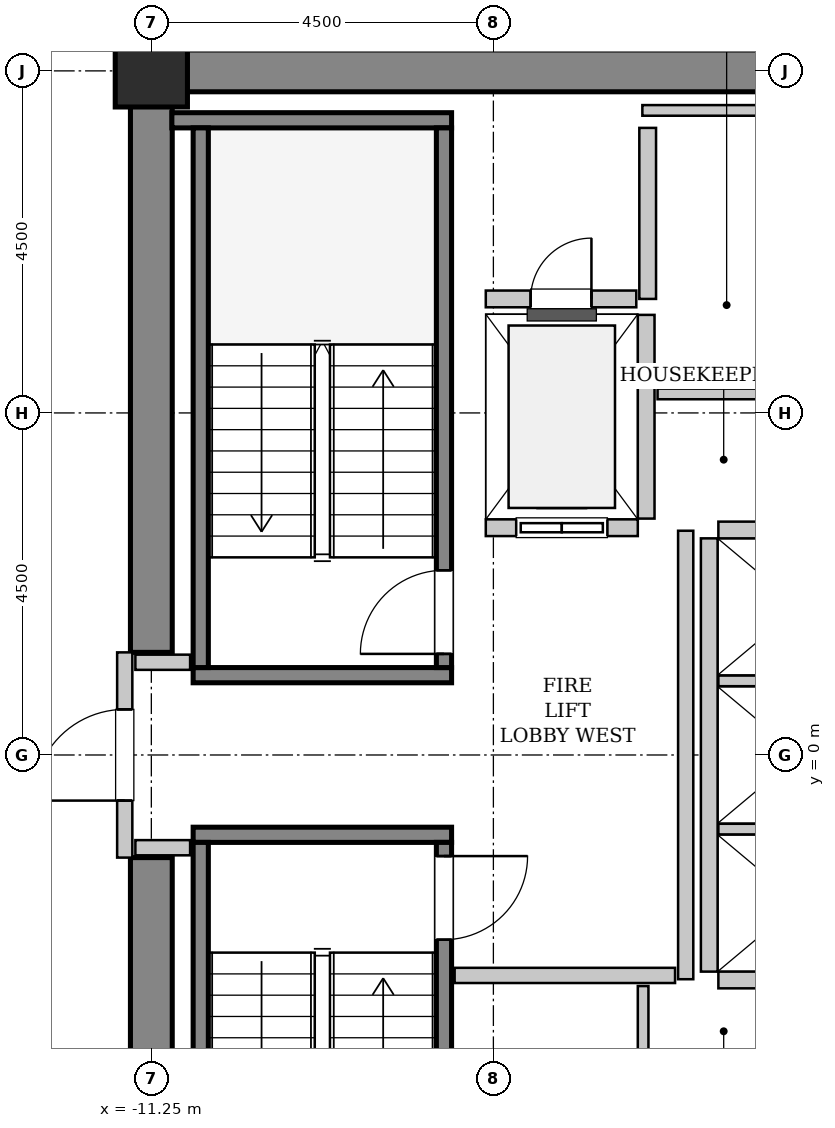
"""IFC4 building model, lengths in metres.
Left out: names, types, materials, properties, quantities, classifications, styles, units other than length and angle.
Written with IfcOpenShell. Run it as: python <this file> out.ifc"""

import sys

from ifc_helpers import new_model, si_unit, direction, frame, frame_2d, origin, origin_2d, place, context, subcontext, project, spatial, rectangle, hollow_rectangle, extrude, source, transform, mapped, element, fill, save


model = new_model("IFC4")
c1 = context("Model", 3, precision=1e-05, world=origin(), true_north=direction((0.0, 1.0)))
c2 = subcontext(c1, "Body", "Model", "MODEL_VIEW")
j1 = project(units=[si_unit("LENGTHUNIT", "METRE"), si_unit("PLANEANGLEUNIT", "RADIAN")], contexts=[c1])
p1 = place(None, origin())
s1 = spatial("IfcSite", under=j1, at=p1, CompositionType="ELEMENT")
p2 = place(p1, origin())
s2 = spatial("IfcBuilding", under=s1, at=p2, CompositionType="ELEMENT")
p3 = place(p2, frame((0.0, 0.0, 167.8)))
s3 = spatial("IfcBuildingStorey", under=s2, at=p3, CompositionType="ELEMENT", Elevation=167.8)
m1 = source(origin(), c2, "Body", "SweptSolid", [
    extrude(rectangle(XDim=9.975, YDim=0.55, at=frame_2d((4.987, 0.0))), origin(), (0.0, 0.0, 1.0), 3.8),
])
p4 = place(p3, frame((-11.525, 9.0, 0.0), z_axis=(0.0, 0.0, 1.0), x_axis=(1.0, 0.0, 0.0)))
e1 = element("IfcWall", 1, at=p4, inside=s3, PredefinedType="SHEAR", context=c2, shape_type="MappedRepresentation", body=[
    mapped(m1, transform((0.0, 0.0, 0.0), x_axis=(1.0, 0.0, 0.0), y_axis=(0.0, 1.0, 0.0), z_axis=(0.0, 0.0, 1.0), scale=1.0)),
])
m2 = source(origin(), c2, "Body", "SweptSolid", [
    extrude(rectangle(XDim=7.375, YDim=0.55, at=frame_2d((3.688, 0.0))), origin(), (0.0, 0.0, 1.0), 3.8),
])
for number, where, z_axis, x_axis in (
    (2, (-11.25, -8.725, 0.0), (0.0, 0.0, 1.0), (0.0, 1.0, 0.0)),
    (3, (-11.25, 1.35, 0.0), (0.0, 0.0, 1.0), (0.0, 1.0, 0.0)),
):
    element("IfcWall", number, at=place(p3, frame(where, z_axis=z_axis, x_axis=x_axis)), inside=s3, PredefinedType="SHEAR", context=c2, shape_type="MappedRepresentation", body=[
        mapped(m2, transform((0.0, 0.0, 0.0), x_axis=(1.0, 0.0, 0.0), y_axis=(0.0, 1.0, 0.0), z_axis=(0.0, 0.0, 1.0), scale=1.0)),
    ])
m3 = source(origin(), c2, "Body", "SweptSolid", [
    extrude(hollow_rectangle(XDim=0.95, YDim=0.95, WallThickness=0.045, InnerFilletRadius=0.045, OuterFilletRadius=0.09, at=origin_2d()), origin(), (0.0, 0.0, 1.0), 3.8),
])
p5 = place(p3, frame((-11.25, 9.0, 0.0), z_axis=(0.0, 0.0, 1.0), x_axis=(1.0, 0.0, 0.0)))
e4 = element("IfcColumn", 4, at=p5, inside=s3, PredefinedType="COLUMN", context=c2, shape_type="MappedRepresentation", body=[
    mapped(m3, transform((0.0, 0.0, 0.0), x_axis=(1.0, 0.0, 0.0), y_axis=(0.0, 1.0, 0.0), z_axis=(0.0, 0.0, 1.0), scale=1.0)),
])
m4 = source(origin(), c2, "Body", "SweptSolid", [
    extrude(rectangle(XDim=3.4, YDim=0.2, at=frame_2d((1.7, 0.0))), origin(), (0.0, 0.0, 1.0), 3.8),
])
p6 = place(p3, frame((-7.3, 1.05, 0.0), z_axis=(0.0, 0.0, 1.0), x_axis=(-1.0, 0.0, 0.0)))
e5 = element("IfcWall", 5, at=p6, inside=s3, PredefinedType="SOLIDWALL", context=c2, shape_type="MappedRepresentation", body=[
    mapped(m4, transform((0.0, 0.0, 0.0), x_axis=(1.0, 0.0, 0.0), y_axis=(0.0, 1.0, 0.0), z_axis=(0.0, 0.0, 1.0), scale=1.0)),
])
m5 = source(origin(), c2, "Body", "SweptSolid", [
    extrude(rectangle(XDim=3.68, YDim=0.2, at=frame_2d((1.84, 0.0))), origin(), (0.0, 0.0, 1.0), 3.8),
])
p7 = place(p3, frame((-7.3, 8.35, 0.0), z_axis=(0.0, 0.0, 1.0), x_axis=(-1.0, 0.0, 0.0)))
e6 = element("IfcWall", 6, at=p7, inside=s3, PredefinedType="SOLIDWALL", context=c2, shape_type="MappedRepresentation", body=[
    mapped(m5, transform((0.0, 0.0, 0.0), x_axis=(1.0, 0.0, 0.0), y_axis=(0.0, 1.0, 0.0), z_axis=(0.0, 0.0, 1.0), scale=1.0)),
])
m6 = source(origin(), c2, "Body", "SweptSolid", [
    extrude(rectangle(XDim=7.1, YDim=0.2, at=frame_2d((3.55, 0.0))), origin(), (0.0, 0.0, 1.0), 3.8),
])
p8 = place(p3, frame((-7.4, 1.15, 0.0), z_axis=(0.0, 0.0, 1.0), x_axis=(0.0, 1.0, 0.0)))
e7 = element("IfcWall", 7, at=p8, inside=s3, PredefinedType="SOLIDWALL", context=c2, shape_type="MappedRepresentation", body=[
    mapped(m6, transform((0.0, 0.0, 0.0), x_axis=(1.0, 0.0, 0.0), y_axis=(0.0, 1.0, 0.0), z_axis=(0.0, 0.0, 1.0), scale=1.0)),
])
p9 = place(p8, frame((0.18, 0.0, 0.0)))
e8 = element("IfcOpeningElement", 8, at=p9, cuts=e7, PredefinedType="OPENING", context=c2, shape_type="SweptSolid", body=[
    extrude(rectangle(XDim=1.1, YDim=2.15, at=frame_2d((0.55, 1.075))), frame((0.0, 0.11, 0.0), z_axis=(0.0, -1.0, 0.0), x_axis=(1.0, 0.0, 0.0)), (0.0, 0.0, 1.0), 0.22),
])
p10 = place(p3, frame((-10.6, 1.15, 0.0), z_axis=(0.0, 0.0, 1.0), x_axis=(0.0, 1.0, 0.0)))
e9 = element("IfcWall", 9, at=p10, inside=s3, PredefinedType="SOLIDWALL", context=c2, shape_type="MappedRepresentation", body=[
    mapped(m6, transform((0.0, 0.0, 0.0), x_axis=(1.0, 0.0, 0.0), y_axis=(0.0, 1.0, 0.0), z_axis=(0.0, 0.0, 1.0), scale=1.0)),
])
p11 = place(p3, frame((-10.7, -1.05, 0.0), z_axis=(0.0, 0.0, 1.0), x_axis=(1.0, 0.0, 0.0)))
e10 = element("IfcWall", 10, at=p11, inside=s3, PredefinedType="SOLIDWALL", context=c2, shape_type="MappedRepresentation", body=[
    mapped(m4, transform((0.0, 0.0, 0.0), x_axis=(1.0, 0.0, 0.0), y_axis=(0.0, 1.0, 0.0), z_axis=(0.0, 0.0, 1.0), scale=1.0)),
])
p12 = place(p3, frame((-10.6, -1.15, 0.0), z_axis=(0.0, 0.0, 1.0), x_axis=(0.0, -1.0, 0.0)))
e11 = element("IfcWall", 11, at=p12, inside=s3, PredefinedType="SOLIDWALL", context=c2, shape_type="MappedRepresentation", body=[
    mapped(m6, transform((0.0, 0.0, 0.0), x_axis=(1.0, 0.0, 0.0), y_axis=(0.0, 1.0, 0.0), z_axis=(0.0, 0.0, 1.0), scale=1.0)),
])
p13 = place(p3, frame((-7.4, -1.15, 0.0), z_axis=(0.0, 0.0, 1.0), x_axis=(0.0, -1.0, 0.0)))
e12 = element("IfcWall", 12, at=p13, inside=s3, PredefinedType="SOLIDWALL", context=c2, shape_type="MappedRepresentation", body=[
    mapped(m6, transform((0.0, 0.0, 0.0), x_axis=(1.0, 0.0, 0.0), y_axis=(0.0, 1.0, 0.0), z_axis=(0.0, 0.0, 1.0), scale=1.0)),
])
p14 = place(p13, frame((0.18, 0.0, 0.0)))
e13 = element("IfcOpeningElement", 13, at=p14, cuts=e12, PredefinedType="OPENING", context=c2, shape_type="SweptSolid", body=[
    extrude(rectangle(XDim=1.1, YDim=2.15, at=frame_2d((0.55, 1.075))), frame((0.0, 0.11, 0.0), z_axis=(0.0, -1.0, 0.0), x_axis=(1.0, 0.0, 0.0)), (0.0, 0.0, 1.0), 0.22),
])
m7 = source(origin(), c2, "Body", "SweptSolid", [
    extrude(rectangle(XDim=2.0, YDim=0.22, at=frame_2d((1.0, 0.0))), origin(), (0.0, 0.0, 1.0), 3.535),
])
p15 = place(p3, frame((-6.85, 2.99, 0.0), z_axis=(0.0, 0.0, 1.0), x_axis=(1.0, 0.0, 0.0)))
e14 = element("IfcWall", 14, at=p15, inside=s3, PredefinedType="SOLIDWALL", context=c2, shape_type="MappedRepresentation", body=[
    mapped(m7, transform((0.0, 0.0, 0.0), x_axis=(1.0, 0.0, 0.0), y_axis=(0.0, 1.0, 0.0), z_axis=(0.0, 0.0, 1.0), scale=1.0)),
])
p16 = place(p15, frame((0.4, 0.0, 0.0)))
e15 = element("IfcOpeningElement", 15, at=p16, cuts=e14, PredefinedType="OPENING", context=c2, shape_type="SweptSolid", body=[
    extrude(rectangle(XDim=1.2, YDim=2.2, at=frame_2d((0.6, 1.1))), frame((0.0, 0.12, 0.0), z_axis=(0.0, -1.0, 0.0), x_axis=(1.0, 0.0, 0.0)), (0.0, 0.0, 1.0), 0.24),
])
m8 = source(origin(), c2, "Body", "SweptSolid", [
    extrude(rectangle(XDim=2.68, YDim=0.22, at=frame_2d((1.34, 0.0))), origin(), (0.0, 0.0, 1.0), 3.535),
])
p17 = place(p3, frame((-4.74, 3.11, 0.0), z_axis=(0.0, 0.0, 1.0), x_axis=(0.0, 1.0, 0.0)))
e16 = element("IfcWall", 16, at=p17, inside=s3, PredefinedType="SOLIDWALL", context=c2, shape_type="MappedRepresentation", body=[
    mapped(m8, transform((0.0, 0.0, 0.0), x_axis=(1.0, 0.0, 0.0), y_axis=(0.0, 1.0, 0.0), z_axis=(0.0, 0.0, 1.0), scale=1.0)),
])
m9 = source(origin(), c2, "Body", "SweptSolid", [
    extrude(rectangle(XDim=5.7, YDim=0.22, at=frame_2d((2.85, 0.0))), origin(), (0.0, 0.0, 1.0), 3.535),
])
p18 = place(p3, frame((-3.91, 2.85, 0.0), z_axis=(0.0, 0.0, 1.0), x_axis=(0.0, -1.0, 0.0)))
e17 = element("IfcWall", 17, at=p18, inside=s3, PredefinedType="SOLIDWALL", context=c2, shape_type="MappedRepresentation", body=[
    mapped(m9, transform((0.0, 0.0, 0.0), x_axis=(1.0, 0.0, 0.0), y_axis=(0.0, 1.0, 0.0), z_axis=(0.0, 0.0, 1.0), scale=1.0)),
])
m10 = source(origin(), c2, "Body", "SweptSolid", [
    extrude(rectangle(XDim=2.13, YDim=0.22, at=frame_2d((1.065, 0.0))), origin(), (0.0, 0.0, 1.0), 3.535),
])
p19 = place(p3, frame((-3.79, -2.96, 0.0), z_axis=(0.0, 0.0, 1.0), x_axis=(1.0, 0.0, 0.0)))
e18 = element("IfcWall", 18, at=p19, inside=s3, PredefinedType="SOLIDWALL", context=c2, shape_type="MappedRepresentation", body=[
    mapped(m10, transform((0.0, 0.0, 0.0), x_axis=(1.0, 0.0, 0.0), y_axis=(0.0, 1.0, 0.0), z_axis=(0.0, 0.0, 1.0), scale=1.0)),
])
m11 = source(origin(), c2, "Body", "SweptSolid", [
    extrude(rectangle(XDim=2.13, YDim=0.14, at=frame_2d((1.065, 0.0))), origin(), (0.0, 0.0, 1.0), 3.535),
])
for number, where, z_axis, x_axis in (
    (19, (-3.79, -0.975, 0.0), (0.0, 0.0, 1.0), (1.0, 0.0, 0.0)),
    (20, (-3.79, 0.975, 0.0), (0.0, 0.0, 1.0), (1.0, 0.0, 0.0)),
):
    element("IfcWall", number, at=place(p3, frame(where, z_axis=z_axis, x_axis=x_axis)), inside=s3, PredefinedType="PARTITIONING", context=c2, shape_type="MappedRepresentation", body=[
        mapped(m11, transform((0.0, 0.0, 0.0), x_axis=(1.0, 0.0, 0.0), y_axis=(0.0, 1.0, 0.0), z_axis=(0.0, 0.0, 1.0), scale=1.0)),
    ])
p20 = place(p3, frame((-1.66, 2.96, 0.0), z_axis=(0.0, 0.0, 1.0), x_axis=(-1.0, 0.0, 0.0)))
e21 = element("IfcWall", 21, at=p20, inside=s3, PredefinedType="SOLIDWALL", context=c2, shape_type="MappedRepresentation", body=[
    mapped(m10, transform((0.0, 0.0, 0.0), x_axis=(1.0, 0.0, 0.0), y_axis=(0.0, 1.0, 0.0), z_axis=(0.0, 0.0, 1.0), scale=1.0)),
])
m12 = source(origin(), c2, "Body", "SweptSolid", [
    extrude(rectangle(XDim=2.25, YDim=0.22, at=frame_2d((1.125, 0.0))), origin(), (0.0, 0.0, 1.0), 3.535),
])
p21 = place(p3, frame((-4.72, 6.0, 0.0), z_axis=(0.0, 0.0, 1.0), x_axis=(0.0, 1.0, 0.0)))
e22 = element("IfcWall", 22, at=p21, inside=s3, PredefinedType="SOLIDWALL", context=c2, shape_type="MappedRepresentation", body=[
    mapped(m12, transform((0.0, 0.0, 0.0), x_axis=(1.0, 0.0, 0.0), y_axis=(0.0, 1.0, 0.0), z_axis=(0.0, 0.0, 1.0), scale=1.0)),
])
m13 = source(origin(), c2, "Body", "SweptSolid", [
    extrude(rectangle(XDim=1.98, YDim=0.22, at=frame_2d((0.99, 0.0))), origin(), (0.0, 0.0, 1.0), 3.535),
])
p22 = place(p3, frame((-6.85, 6.0, 0.0), z_axis=(0.0, 0.0, 1.0), x_axis=(1.0, 0.0, 0.0)))
e23 = element("IfcWall", 23, at=p22, inside=s3, PredefinedType="SOLIDWALL", context=c2, shape_type="MappedRepresentation", body=[
    mapped(m13, transform((0.0, 0.0, 0.0), x_axis=(1.0, 0.0, 0.0), y_axis=(0.0, 1.0, 0.0), z_axis=(0.0, 0.0, 1.0), scale=1.0)),
])
p23 = place(p22, frame((0.59, 0.0, 0.0)))
e24 = element("IfcOpeningElement", 24, at=p23, cuts=e23, PredefinedType="OPENING", context=c2, shape_type="SweptSolid", body=[
    extrude(rectangle(XDim=0.8, YDim=2.0, at=frame_2d((0.4, 1.0))), frame((0.0, 0.12, 0.0), z_axis=(0.0, -1.0, 0.0), x_axis=(1.0, 0.0, 0.0)), (0.0, 0.0, 1.0), 0.24),
])
m14 = source(origin(), c2, "Body", "SweptSolid", [
    extrude(rectangle(XDim=2.7, YDim=0.2, at=frame_2d((1.35, 0.0))), origin(), (0.0, 0.0, 1.0), 2.425),
])
p24 = place(p3, frame((-11.6, -1.35, 0.0), z_axis=(0.0, 0.0, 1.0), x_axis=(0.0, 1.0, 0.0)))
e25 = element("IfcWall", 25, at=p24, inside=s3, PredefinedType="PARTITIONING", context=c2, shape_type="MappedRepresentation", body=[
    mapped(m14, transform((0.0, 0.0, 0.0), x_axis=(1.0, 0.0, 0.0), y_axis=(0.0, 1.0, 0.0), z_axis=(0.0, 0.0, 1.0), scale=1.0)),
])
p25 = place(p24, frame((0.75, 0.0, 0.0)))
e26 = element("IfcOpeningElement", 26, at=p25, cuts=e25, PredefinedType="OPENING", context=c2, shape_type="SweptSolid", body=[
    extrude(rectangle(XDim=1.2, YDim=2.15, at=frame_2d((0.6, 1.075))), frame((0.0, 0.11, 0.0), z_axis=(0.0, -1.0, 0.0), x_axis=(1.0, 0.0, 0.0)), (0.0, 0.0, 1.0), 0.22),
])
m15 = source(origin(), c2, "Body", "SweptSolid", [
    extrude(rectangle(XDim=5.9, YDim=0.2, at=frame_2d((2.95, 0.0))), origin(), (0.0, 0.0, 1.0), 3.535),
])
p26 = place(p3, frame((-4.22, -2.95, 0.0), z_axis=(0.0, 0.0, 1.0), x_axis=(0.0, 1.0, 0.0)))
e27 = element("IfcWall", 27, at=p26, inside=s3, PredefinedType="PARTITIONING", context=c2, shape_type="MappedRepresentation", body=[
    mapped(m15, transform((0.0, 0.0, 0.0), x_axis=(1.0, 0.0, 0.0), y_axis=(0.0, 1.0, 0.0), z_axis=(0.0, 0.0, 1.0), scale=1.0)),
])
m16 = source(origin(), c2, "Body", "SweptSolid", [
    extrude(rectangle(XDim=2.9, YDim=0.2, at=frame_2d((1.45, 0.0))), origin(), (0.0, 0.0, 1.0), 3.535),
])
p27 = place(p3, frame((-7.26, -2.9, 0.0), z_axis=(0.0, 0.0, 1.0), x_axis=(1.0, 0.0, 0.0)))
e28 = element("IfcWall", 28, at=p27, inside=s3, PredefinedType="PARTITIONING", context=c2, shape_type="MappedRepresentation", body=[
    mapped(m16, transform((0.0, 0.0, 0.0), x_axis=(1.0, 0.0, 0.0), y_axis=(0.0, 1.0, 0.0), z_axis=(0.0, 0.0, 1.0), scale=1.0)),
])
m17 = source(origin(), c2, "Body", "SweptSolid", [
    extrude(rectangle(XDim=0.72, YDim=0.2, at=frame_2d((0.36, 0.0))), origin(), (0.0, 0.0, 1.0), 3.535),
])
for number, where, z_axis, x_axis in (
    (29, (-11.46, 1.22, 0.0), (0.0, 0.0, 1.0), (1.0, 0.0, 0.0)),
    (30, (-11.46, -1.22, 0.0), (0.0, 0.0, 1.0), (1.0, 0.0, 0.0)),
):
    element("IfcWall", number, at=place(p3, frame(where, z_axis=z_axis, x_axis=x_axis)), inside=s3, PredefinedType="PARTITIONING", context=c2, shape_type="MappedRepresentation", body=[
        mapped(m17, transform((0.0, 0.0, 0.0), x_axis=(1.0, 0.0, 0.0), y_axis=(0.0, 1.0, 0.0), z_axis=(0.0, 0.0, 1.0), scale=1.0)),
    ])
m18 = source(origin(), c2, "Body", "SweptSolid", [
    extrude(rectangle(XDim=2.95, YDim=0.14, at=frame_2d((1.475, 0.0))), origin(), (0.0, 0.0, 1.0), 3.535),
])
p28 = place(p3, frame((-4.59, 4.75, 0.0), z_axis=(0.0, 0.0, 1.0), x_axis=(1.0, 0.0, 0.0)))
e31 = element("IfcWall", 31, at=p28, inside=s3, PredefinedType="PARTITIONING", context=c2, shape_type="MappedRepresentation", body=[
    mapped(m18, transform((0.0, 0.0, 0.0), x_axis=(1.0, 0.0, 0.0), y_axis=(0.0, 1.0, 0.0), z_axis=(0.0, 0.0, 1.0), scale=1.0)),
])
m19 = source(origin(), c2, "Body", "SweptSolid", [
    extrude(rectangle(XDim=3.15, YDim=0.14, at=frame_2d((1.575, 0.0))), origin(), (0.0, 0.0, 1.0), 3.535),
])
p29 = place(p3, frame((-4.79, 8.48, 0.0), z_axis=(0.0, 0.0, 1.0), x_axis=(1.0, 0.0, 0.0)))
e32 = element("IfcWall", 32, at=p29, inside=s3, PredefinedType="PARTITIONING", context=c2, shape_type="MappedRepresentation", body=[
    mapped(m19, transform((0.0, 0.0, 0.0), x_axis=(1.0, 0.0, 0.0), y_axis=(0.0, 1.0, 0.0), z_axis=(0.0, 0.0, 1.0), scale=1.0)),
])
m20 = source(origin(), c2, "Body", "SweptSolid", [
    extrude(rectangle(XDim=1.1, YDim=0.14, at=frame_2d((0.55, 0.0))), origin(), (0.0, 0.0, 1.0), 3.535),
])
p30 = place(p3, frame((-4.78, -4.14, 0.0), z_axis=(0.0, 0.0, 1.0), x_axis=(0.0, 1.0, 0.0)))
e33 = element("IfcWall", 33, at=p30, inside=s3, PredefinedType="PARTITIONING", context=c2, shape_type="MappedRepresentation", body=[
    mapped(m20, transform((0.0, 0.0, 0.0), x_axis=(1.0, 0.0, 0.0), y_axis=(0.0, 1.0, 0.0), z_axis=(0.0, 0.0, 1.0), scale=1.0)),
])
m21 = source(origin(), c2, "Body", "SweptSolid", [
    extrude(rectangle(XDim=1.1, YDim=2.15, at=frame_2d((0.55, 1.075))), frame((0.0, 0.025, 0.0), z_axis=(0.0, -1.0, 0.0), x_axis=(1.0, 0.0, 0.0)), (0.0, 0.0, 1.0), 0.05),
])
p31 = place(p9, origin())
e34 = element("IfcDoor", 34, at=p31, inside=s3, OperationType="SINGLE_SWING_LEFT", PredefinedType="DOOR", context=c2, shape_type="MappedRepresentation", body=[
    mapped(m21, transform((0.0, 0.0, 0.0), x_axis=(1.0, 0.0, 0.0), y_axis=(0.0, 1.0, 0.0), z_axis=(0.0, 0.0, 1.0), scale=1.0)),
])
fill(e8, e34)
p32 = place(p14, origin())
e35 = element("IfcDoor", 35, at=p32, inside=s3, OperationType="SINGLE_SWING_LEFT", PredefinedType="DOOR", context=c2, shape_type="MappedRepresentation", body=[
    mapped(m21, transform((0.0, 0.0, 0.0), x_axis=(1.0, 0.0, 0.0), y_axis=(0.0, 1.0, 0.0), z_axis=(0.0, 0.0, 1.0), scale=1.0)),
])
fill(e13, e35)
m22 = source(origin(), c2, "Body", "SweptSolid", [
    extrude(rectangle(XDim=1.2, YDim=2.2, at=frame_2d((0.6, 1.1))), frame((0.0, 0.025, 0.0), z_axis=(0.0, -1.0, 0.0), x_axis=(1.0, 0.0, 0.0)), (0.0, 0.0, 1.0), 0.05),
])
p33 = place(p16, origin())
e36 = element("IfcDoor", 36, at=p33, inside=s3, OperationType="SLIDING_TO_LEFT", PredefinedType="DOOR", context=c2, shape_type="MappedRepresentation", body=[
    mapped(m22, transform((0.0, 0.0, 0.0), x_axis=(1.0, 0.0, 0.0), y_axis=(0.0, 1.0, 0.0), z_axis=(0.0, 0.0, 1.0), scale=1.0)),
])
fill(e15, e36)
m23 = source(origin(), c2, "Body", "SweptSolid", [
    extrude(rectangle(XDim=0.8, YDim=2.0, at=frame_2d((0.4, 1.0))), frame((0.0, 0.025, 0.0), z_axis=(0.0, -1.0, 0.0), x_axis=(1.0, 0.0, 0.0)), (0.0, 0.0, 1.0), 0.05),
])
p34 = place(p23, origin())
e37 = element("IfcDoor", 37, at=p34, inside=s3, OperationType="SINGLE_SWING_RIGHT", PredefinedType="TRAPDOOR", context=c2, shape_type="MappedRepresentation", body=[
    mapped(m23, transform((0.0, 0.0, 0.0), x_axis=(1.0, 0.0, 0.0), y_axis=(0.0, 1.0, 0.0), z_axis=(0.0, 0.0, 1.0), scale=1.0)),
])
fill(e24, e37)
m24 = source(origin(), c2, "Body", "SweptSolid", [
    extrude(rectangle(XDim=1.2, YDim=2.15, at=frame_2d((0.6, 1.075))), frame((0.0, 0.025, 0.0), z_axis=(0.0, -1.0, 0.0), x_axis=(1.0, 0.0, 0.0)), (0.0, 0.0, 1.0), 0.05),
])
p35 = place(p25, origin())
e38 = element("IfcDoor", 38, at=p35, inside=s3, OperationType="SINGLE_SWING_LEFT", PredefinedType="DOOR", context=c2, shape_type="MappedRepresentation", body=[
    mapped(m24, transform((0.0, 0.0, 0.0), x_axis=(1.0, 0.0, 0.0), y_axis=(0.0, 1.0, 0.0), z_axis=(0.0, 0.0, 1.0), scale=1.0)),
])
fill(e26, e38)
save(model, sys.argv[1])
